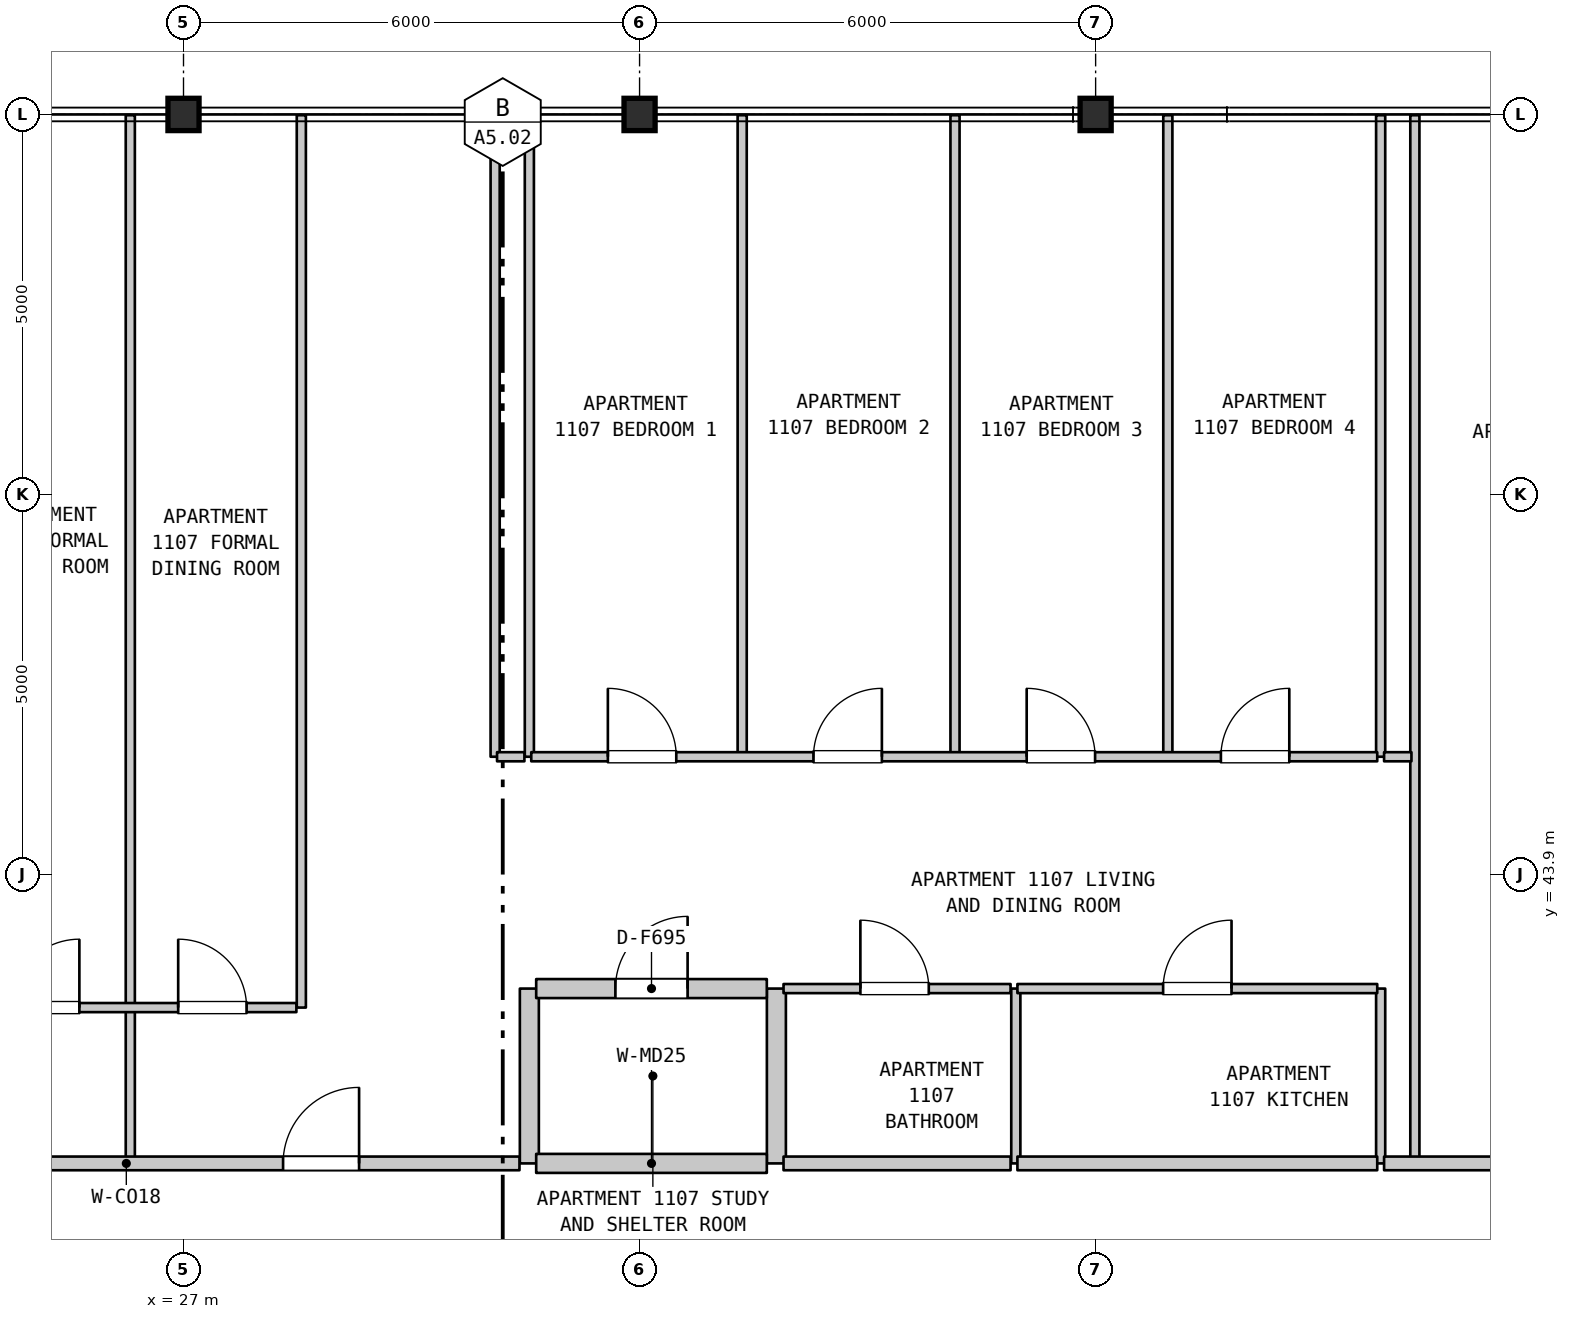
"""IFC4 building model, lengths in metres.
Left out: names, types, materials, properties, quantities, classifications, styles, units other than length and angle.
Written with IfcOpenShell. Run it as: python <this file> out.ifc"""

import sys

from ifc_helpers import new_model, si_unit, direction, frame, frame_2d, origin, origin_2d, place, context, subcontext, project, spatial, rectangle, i_section, extrude, element, fill, save


model = new_model("IFC4")
c1 = context("Model", 3, precision=1e-05, world=origin(), true_north=direction((0.0, 1.0)))
c2 = subcontext(c1, "Body", "Model", "MODEL_VIEW")
j1 = project(units=[si_unit("LENGTHUNIT", "METRE"), si_unit("PLANEANGLEUNIT", "RADIAN")], contexts=[c1])
p1 = place(None, origin())
s1 = spatial("IfcSite", under=j1, at=p1, CompositionType="ELEMENT")
p2 = place(p1, origin())
s2 = spatial("IfcBuilding", under=s1, at=p2, CompositionType="ELEMENT")
p3 = place(p2, frame((0.0, 0.0, 49.9)))
s3 = spatial("IfcBuildingStorey", under=s2, at=p3, CompositionType="ELEMENT", Elevation=49.9)
for number, where, z_axis, x_axis in (
    (1, (27.0, 53.9, 0.0), (0.0, 0.0, 1.0), (1.0, 0.0, 0.0)),
    (2, (33.0, 53.9, 0.0), (0.0, 0.0, 1.0), (1.0, 0.0, 0.0)),
    (3, (39.0, 53.9, 0.0), (0.0, 0.0, 1.0), (1.0, 0.0, 0.0)),
):
    element("IfcColumn", number, at=place(p3, frame(where, z_axis=z_axis, x_axis=x_axis)), inside=s3, PredefinedType="COLUMN", context=c2, shape_type="SweptSolid", body=[
        extrude(i_section(OverallWidth=0.409, OverallDepth=0.425, WebThickness=0.032, FlangeThickness=0.052, FilletRadius=0.015, at=origin_2d()), origin(), (0.0, 0.0, 1.0), 3.7),
    ])
p4 = place(p3, frame((26.3, 40.1, 0.0), z_axis=(0.0, 0.0, 1.0), x_axis=(0.0, 1.0, 0.0)))
e4 = element("IfcWall", 4, at=p4, inside=s3, PredefinedType="PARTITIONING", context=c2, shape_type="SweptSolid", body=[
    extrude(rectangle(XDim=2.05, YDim=0.12, at=frame_2d((1.025, 0.0))), origin(), (0.0, 0.0, 1.0), 3.385),
])
for number, where, z_axis, x_axis in (
    (5, (26.3, 42.15, 0.0), (0.0, 0.0, 1.0), (0.0, 1.0, 0.0)),
    (6, (28.55, 42.15, 0.0), (0.0, 0.0, 1.0), (0.0, 1.0, 0.0)),
):
    element("IfcWall", number, at=place(p3, frame(where, z_axis=z_axis, x_axis=x_axis)), inside=s3, PredefinedType="PARTITIONING", context=c2, shape_type="SweptSolid", body=[
        extrude(rectangle(XDim=11.74, YDim=0.12, at=frame_2d((5.87, 0.0))), origin(), (0.0, 0.0, 1.0), 3.385),
    ])
p5 = place(p3, frame((31.1, 45.45, 0.0), z_axis=(0.0, 0.0, 1.0), x_axis=(0.0, 1.0, 0.0)))
e7 = element("IfcWall", 7, at=p5, inside=s3, PredefinedType="PARTITIONING", context=c2, shape_type="SweptSolid", body=[
    extrude(rectangle(XDim=8.44, YDim=0.12, at=frame_2d((4.22, 0.0))), origin(), (0.0, 0.0, 1.0), 3.385),
])
p6 = place(p3, frame((31.55, 40.1, 0.0), z_axis=(0.0, 0.0, 1.0), x_axis=(0.0, 1.0, 0.0)))
e8 = element("IfcWall", 8, at=p6, inside=s3, PredefinedType="STANDARD", context=c2, shape_type="SweptSolid", body=[
    extrude(rectangle(XDim=2.3, YDim=0.25, at=frame_2d((1.15, 0.0))), origin(), (0.0, 0.0, 1.0), 3.385),
])
for number, where, z_axis, x_axis in (
    (9, (31.55, 45.45, 0.0), (0.0, 0.0, 1.0), (0.0, 1.0, 0.0)),
    (10, (34.35, 45.45, 0.0), (0.0, 0.0, 1.0), (0.0, 1.0, 0.0)),
):
    element("IfcWall", number, at=place(p3, frame(where, z_axis=z_axis, x_axis=x_axis)), inside=s3, PredefinedType="PARTITIONING", context=c2, shape_type="SweptSolid", body=[
        extrude(rectangle(XDim=8.44, YDim=0.12, at=frame_2d((4.22, 0.0))), origin(), (0.0, 0.0, 1.0), 3.385),
    ])
p7 = place(p3, frame((34.8, 40.1, 0.0), z_axis=(0.0, 0.0, 1.0), x_axis=(0.0, 1.0, 0.0)))
e11 = element("IfcWall", 11, at=p7, inside=s3, PredefinedType="STANDARD", context=c2, shape_type="SweptSolid", body=[
    extrude(rectangle(XDim=2.3, YDim=0.25, at=frame_2d((1.15, 0.0))), origin(), (0.0, 0.0, 1.0), 3.385),
])
p8 = place(p3, frame((37.15, 45.45, 0.0), z_axis=(0.0, 0.0, 1.0), x_axis=(0.0, 1.0, 0.0)))
e12 = element("IfcWall", 12, at=p8, inside=s3, PredefinedType="PARTITIONING", context=c2, shape_type="SweptSolid", body=[
    extrude(rectangle(XDim=8.44, YDim=0.12, at=frame_2d((4.22, 0.0))), origin(), (0.0, 0.0, 1.0), 3.385),
])
p9 = place(p3, frame((37.95, 40.1, 0.0), z_axis=(0.0, 0.0, 1.0), x_axis=(0.0, 1.0, 0.0)))
e13 = element("IfcWall", 13, at=p9, inside=s3, PredefinedType="PARTITIONING", context=c2, shape_type="SweptSolid", body=[
    extrude(rectangle(XDim=2.3, YDim=0.12, at=frame_2d((1.15, 0.0))), origin(), (0.0, 0.0, 1.0), 3.385),
])
p10 = place(p3, frame((39.95, 45.45, 0.0), z_axis=(0.0, 0.0, 1.0), x_axis=(0.0, 1.0, 0.0)))
e14 = element("IfcWall", 14, at=p10, inside=s3, PredefinedType="PARTITIONING", context=c2, shape_type="SweptSolid", body=[
    extrude(rectangle(XDim=8.44, YDim=0.12, at=frame_2d((4.22, 0.0))), origin(), (0.0, 0.0, 1.0), 3.385),
])
p11 = place(p3, frame((42.75, 40.1, 0.0), z_axis=(0.0, 0.0, 1.0), x_axis=(0.0, 1.0, 0.0)))
e15 = element("IfcWall", 15, at=p11, inside=s3, PredefinedType="PARTITIONING", context=c2, shape_type="SweptSolid", body=[
    extrude(rectangle(XDim=2.3, YDim=0.12, at=frame_2d((1.15, 0.0))), origin(), (0.0, 0.0, 1.0), 3.385),
])
p12 = place(p3, frame((42.75, 45.45, 0.0), z_axis=(0.0, 0.0, 1.0), x_axis=(0.0, 1.0, 0.0)))
e16 = element("IfcWall", 16, at=p12, inside=s3, PredefinedType="PARTITIONING", context=c2, shape_type="SweptSolid", body=[
    extrude(rectangle(XDim=8.44, YDim=0.12, at=frame_2d((4.22, 0.0))), origin(), (0.0, 0.0, 1.0), 3.385),
])
p13 = place(p3, frame((43.2, 40.1, 0.0), z_axis=(0.0, 0.0, 1.0), x_axis=(0.0, 1.0, 0.0)))
e17 = element("IfcWall", 17, at=p13, inside=s3, PredefinedType="PARTITIONING", context=c2, shape_type="SweptSolid", body=[
    extrude(rectangle(XDim=13.79, YDim=0.12, at=frame_2d((6.895, 0.0))), origin(), (0.0, 0.0, 1.0), 3.385),
])
p14 = place(p3, frame((21.075, 40.1, 0.0), z_axis=(0.0, 0.0, 1.0), x_axis=(1.0, 0.0, 0.0)))
e18 = element("IfcWall", 18, at=p14, inside=s3, PredefinedType="STANDARD", context=c2, shape_type="SweptSolid", body=[
    extrude(rectangle(XDim=10.345, YDim=0.18, at=frame_2d((5.172, 0.0))), origin(), (0.0, 0.0, 1.0), 3.385),
])
p15 = place(p14, frame((2.035, 0.0, 0.0)))
e19 = element("IfcOpeningElement", 19, at=p15, cuts=e18, PredefinedType="OPENING", context=c2, shape_type="SweptSolid", body=[
    extrude(rectangle(XDim=1.0, YDim=2.15, at=frame_2d((0.5, 1.075))), frame((0.0, 0.1, 0.0), z_axis=(0.0, -1.0, 0.0), x_axis=(1.0, 0.0, 0.0)), (0.0, 0.0, 1.0), 0.2),
])
p16 = place(p14, frame((7.235, 0.0, 0.0)))
e20 = element("IfcOpeningElement", 20, at=p16, cuts=e18, PredefinedType="OPENING", context=c2, shape_type="SweptSolid", body=[
    extrude(rectangle(XDim=1.0, YDim=2.15, at=frame_2d((0.5, 1.075))), frame((0.0, 0.1, 0.0), z_axis=(0.0, -1.0, 0.0), x_axis=(1.0, 0.0, 0.0)), (0.0, 0.0, 1.0), 0.2),
])
p17 = place(p3, frame((31.64, 40.1, 0.0), z_axis=(0.0, 0.0, 1.0), x_axis=(1.0, 0.0, 0.0)))
e21 = element("IfcWall", 21, at=p17, inside=s3, PredefinedType="STANDARD", context=c2, shape_type="SweptSolid", body=[
    extrude(rectangle(XDim=3.034, YDim=0.25, at=frame_2d((1.517, 0.0))), origin(), (0.0, 0.0, 1.0), 3.385),
])
p18 = place(p3, frame((34.894, 40.1, 0.0), z_axis=(0.0, 0.0, 1.0), x_axis=(1.0, 0.0, 0.0)))
e22 = element("IfcWall", 22, at=p18, inside=s3, PredefinedType="STANDARD", context=c2, shape_type="SweptSolid", body=[
    extrude(rectangle(XDim=2.987, YDim=0.18, at=frame_2d((1.494, 0.0))), origin(), (0.0, 0.0, 1.0), 3.385),
])
p19 = place(p3, frame((37.971, 40.1, 0.0), z_axis=(0.0, 0.0, 1.0), x_axis=(1.0, 0.0, 0.0)))
e23 = element("IfcWall", 23, at=p19, inside=s3, PredefinedType="STANDARD", context=c2, shape_type="SweptSolid", body=[
    extrude(rectangle(XDim=4.734, YDim=0.18, at=frame_2d((2.367, 0.0))), origin(), (0.0, 0.0, 1.0), 3.385),
])
p20 = place(p3, frame((42.795, 40.1, 0.0), z_axis=(0.0, 0.0, 1.0), x_axis=(1.0, 0.0, 0.0)))
e24 = element("IfcWall", 24, at=p20, inside=s3, PredefinedType="STANDARD", context=c2, shape_type="SweptSolid", body=[
    extrude(rectangle(XDim=3.96, YDim=0.18, at=frame_2d((1.98, 0.0))), origin(), (0.0, 0.0, 1.0), 3.385),
])
p21 = place(p20, frame((1.609, 0.0, 0.0)))
e25 = element("IfcOpeningElement", 25, at=p21, cuts=e24, PredefinedType="OPENING", context=c2, shape_type="SweptSolid", body=[
    extrude(rectangle(XDim=1.0, YDim=2.15, at=frame_2d((0.5, 1.075))), frame((0.0, 0.1, 0.0), z_axis=(0.0, -1.0, 0.0), x_axis=(1.0, 0.0, 0.0)), (0.0, 0.0, 1.0), 0.2),
])
p22 = place(p3, frame((24.075, 42.15, 0.0), z_axis=(0.0, 0.0, 1.0), x_axis=(1.0, 0.0, 0.0)))
e26 = element("IfcWall", 26, at=p22, inside=s3, PredefinedType="PARTITIONING", context=c2, shape_type="SweptSolid", body=[
    extrude(rectangle(XDim=4.41, YDim=0.12, at=frame_2d((2.205, 0.0))), origin(), (0.0, 0.0, 1.0), 3.385),
])
p23 = place(p22, frame((0.655, 0.0, 0.0)))
e27 = element("IfcOpeningElement", 27, at=p23, cuts=e26, PredefinedType="OPENING", context=c2, shape_type="SweptSolid", body=[
    extrude(rectangle(XDim=0.9, YDim=2.15, at=frame_2d((0.45, 1.075))), frame((0.0, 0.07, 0.0), z_axis=(0.0, -1.0, 0.0), x_axis=(1.0, 0.0, 0.0)), (0.0, 0.0, 1.0), 0.14),
])
p24 = place(p22, frame((2.855, 0.0, 0.0)))
e28 = element("IfcOpeningElement", 28, at=p24, cuts=e26, PredefinedType="OPENING", context=c2, shape_type="SweptSolid", body=[
    extrude(rectangle(XDim=0.9, YDim=2.15, at=frame_2d((0.45, 1.075))), frame((0.0, 0.07, 0.0), z_axis=(0.0, -1.0, 0.0), x_axis=(1.0, 0.0, 0.0)), (0.0, 0.0, 1.0), 0.14),
])
p25 = place(p3, frame((31.64, 42.4, 0.0), z_axis=(0.0, 0.0, 1.0), x_axis=(1.0, 0.0, 0.0)))
e29 = element("IfcWall", 29, at=p25, inside=s3, PredefinedType="STANDARD", context=c2, shape_type="SweptSolid", body=[
    extrude(rectangle(XDim=3.034, YDim=0.25, at=frame_2d((1.517, 0.0))), origin(), (0.0, 0.0, 1.0), 3.385),
])
p26 = place(p25, frame((1.042, 0.0, 0.0)))
e30 = element("IfcOpeningElement", 30, at=p26, cuts=e29, PredefinedType="OPENING", context=c2, shape_type="SweptSolid", body=[
    extrude(rectangle(XDim=0.95, YDim=2.15, at=frame_2d((0.475, 1.075))), frame((0.0, 0.135, 0.0), z_axis=(0.0, -1.0, 0.0), x_axis=(1.0, 0.0, 0.0)), (0.0, 0.0, 1.0), 0.27),
])
p27 = place(p3, frame((34.894, 42.4, 0.0), z_axis=(0.0, 0.0, 1.0), x_axis=(1.0, 0.0, 0.0)))
e31 = element("IfcWall", 31, at=p27, inside=s3, PredefinedType="PARTITIONING", context=c2, shape_type="SweptSolid", body=[
    extrude(rectangle(XDim=2.987, YDim=0.12, at=frame_2d((1.494, 0.0))), origin(), (0.0, 0.0, 1.0), 3.385),
])
p28 = place(p27, frame((1.011, 0.0, 0.0)))
e32 = element("IfcOpeningElement", 32, at=p28, cuts=e31, PredefinedType="OPENING", context=c2, shape_type="SweptSolid", body=[
    extrude(rectangle(XDim=0.9, YDim=2.1, at=frame_2d((0.45, 1.05))), frame((0.0, 0.07, 0.0), z_axis=(0.0, -1.0, 0.0), x_axis=(1.0, 0.0, 0.0)), (0.0, 0.0, 1.0), 0.14),
])
p29 = place(p3, frame((37.971, 42.4, 0.0), z_axis=(0.0, 0.0, 1.0), x_axis=(1.0, 0.0, 0.0)))
e33 = element("IfcWall", 33, at=p29, inside=s3, PredefinedType="PARTITIONING", context=c2, shape_type="SweptSolid", body=[
    extrude(rectangle(XDim=4.734, YDim=0.12, at=frame_2d((2.367, 0.0))), origin(), (0.0, 0.0, 1.0), 3.385),
])
p30 = place(p29, frame((1.917, 0.0, 0.0)))
e34 = element("IfcOpeningElement", 34, at=p30, cuts=e33, PredefinedType="OPENING", context=c2, shape_type="SweptSolid", body=[
    extrude(rectangle(XDim=0.9, YDim=2.15, at=frame_2d((0.45, 1.075))), frame((0.0, 0.07, 0.0), z_axis=(0.0, -1.0, 0.0), x_axis=(1.0, 0.0, 0.0)), (0.0, 0.0, 1.0), 0.14),
])
p31 = place(p3, frame((31.125, 45.45, 0.0), z_axis=(0.0, 0.0, 1.0), x_axis=(1.0, 0.0, 0.0)))
e35 = element("IfcWall", 35, at=p31, inside=s3, PredefinedType="PARTITIONING", context=c2, shape_type="SweptSolid", body=[
    extrude(rectangle(XDim=0.36, YDim=0.12, at=frame_2d((0.18, 0.0))), origin(), (0.0, 0.0, 1.0), 3.385),
])
p32 = place(p3, frame((31.575, 45.45, 0.0), z_axis=(0.0, 0.0, 1.0), x_axis=(1.0, 0.0, 0.0)))
e36 = element("IfcWall", 36, at=p32, inside=s3, PredefinedType="PARTITIONING", context=c2, shape_type="SweptSolid", body=[
    extrude(rectangle(XDim=11.13, YDim=0.12, at=frame_2d((5.565, 0.0))), origin(), (0.0, 0.0, 1.0), 3.385),
])
p33 = place(p32, frame((1.008, 0.0, 0.0)))
e37 = element("IfcOpeningElement", 37, at=p33, cuts=e36, PredefinedType="OPENING", context=c2, shape_type="SweptSolid", body=[
    extrude(rectangle(XDim=0.9, YDim=2.15, at=frame_2d((0.45, 1.075))), frame((0.0, 0.07, 0.0), z_axis=(0.0, -1.0, 0.0), x_axis=(1.0, 0.0, 0.0)), (0.0, 0.0, 1.0), 0.14),
])
p34 = place(p32, frame((3.713, 0.0, 0.0)))
e38 = element("IfcOpeningElement", 38, at=p34, cuts=e36, PredefinedType="OPENING", context=c2, shape_type="SweptSolid", body=[
    extrude(rectangle(XDim=0.9, YDim=2.15, at=frame_2d((0.45, 1.075))), frame((0.0, 0.07, 0.0), z_axis=(0.0, -1.0, 0.0), x_axis=(1.0, 0.0, 0.0)), (0.0, 0.0, 1.0), 0.14),
])
p35 = place(p32, frame((6.518, 0.0, 0.0)))
e39 = element("IfcOpeningElement", 39, at=p35, cuts=e36, PredefinedType="OPENING", context=c2, shape_type="SweptSolid", body=[
    extrude(rectangle(XDim=0.9, YDim=2.15, at=frame_2d((0.45, 1.075))), frame((0.0, 0.07, 0.0), z_axis=(0.0, -1.0, 0.0), x_axis=(1.0, 0.0, 0.0)), (0.0, 0.0, 1.0), 0.14),
])
p36 = place(p32, frame((9.073, 0.0, 0.0)))
e40 = element("IfcOpeningElement", 40, at=p36, cuts=e36, PredefinedType="OPENING", context=c2, shape_type="SweptSolid", body=[
    extrude(rectangle(XDim=0.9, YDim=2.15, at=frame_2d((0.45, 1.075))), frame((0.0, 0.07, 0.0), z_axis=(0.0, -1.0, 0.0), x_axis=(1.0, 0.0, 0.0)), (0.0, 0.0, 1.0), 0.14),
])
p37 = place(p3, frame((42.795, 45.45, 0.0), z_axis=(0.0, 0.0, 1.0), x_axis=(1.0, 0.0, 0.0)))
e41 = element("IfcWall", 41, at=p37, inside=s3, PredefinedType="PARTITIONING", context=c2, shape_type="SweptSolid", body=[
    extrude(rectangle(XDim=0.36, YDim=0.12, at=frame_2d((0.18, 0.0))), origin(), (0.0, 0.0, 1.0), 3.385),
])
p38 = place(p16, origin())
e42 = element("IfcDoor", 42, at=p38, inside=s3, OperationType="SINGLE_SWING_RIGHT", PredefinedType="DOOR", context=c2, shape_type="SweptSolid", body=[
    extrude(rectangle(XDim=1.0, YDim=2.15, at=frame_2d((0.5, 1.075))), frame((0.0, 0.025, 0.0), z_axis=(0.0, -1.0, 0.0), x_axis=(1.0, 0.0, 0.0)), (0.0, 0.0, 1.0), 0.05),
])
fill(e20, e42)
p39 = place(p23, origin())
e43 = element("IfcDoor", 43, at=p39, inside=s3, OperationType="SINGLE_SWING_RIGHT", PredefinedType="DOOR", context=c2, shape_type="SweptSolid", body=[
    extrude(rectangle(XDim=0.9, YDim=2.15, at=frame_2d((0.45, 1.075))), frame((0.0, 0.025, 0.0), z_axis=(0.0, -1.0, 0.0), x_axis=(1.0, 0.0, 0.0)), (0.0, 0.0, 1.0), 0.05),
])
fill(e27, e43)
p40 = place(p24, origin())
e44 = element("IfcDoor", 44, at=p40, inside=s3, OperationType="SINGLE_SWING_LEFT", PredefinedType="DOOR", context=c2, shape_type="SweptSolid", body=[
    extrude(rectangle(XDim=0.9, YDim=2.15, at=frame_2d((0.45, 1.075))), frame((0.0, 0.025, 0.0), z_axis=(0.0, -1.0, 0.0), x_axis=(1.0, 0.0, 0.0)), (0.0, 0.0, 1.0), 0.05),
])
fill(e28, e44)
p41 = place(p26, origin())
e45 = element("IfcDoor", 45, at=p41, inside=s3, OperationType="SINGLE_SWING_RIGHT", PredefinedType="DOOR", context=c2, shape_type="SweptSolid", body=[
    extrude(rectangle(XDim=0.95, YDim=2.15, at=frame_2d((0.475, 1.075))), frame((0.0, 0.025, 0.0), z_axis=(0.0, -1.0, 0.0), x_axis=(1.0, 0.0, 0.0)), (0.0, 0.0, 1.0), 0.05),
])
fill(e30, e45)
p42 = place(p28, origin())
e46 = element("IfcDoor", 46, at=p42, inside=s3, OperationType="SINGLE_SWING_LEFT", PredefinedType="DOOR", context=c2, shape_type="SweptSolid", body=[
    extrude(rectangle(XDim=0.9, YDim=2.1, at=frame_2d((0.45, 1.05))), frame((0.0, 0.025, 0.0), z_axis=(0.0, -1.0, 0.0), x_axis=(1.0, 0.0, 0.0)), (0.0, 0.0, 1.0), 0.05),
])
fill(e32, e46)
p43 = place(p30, origin())
e47 = element("IfcDoor", 47, at=p43, inside=s3, OperationType="SINGLE_SWING_RIGHT", PredefinedType="DOOR", context=c2, shape_type="SweptSolid", body=[
    extrude(rectangle(XDim=0.9, YDim=2.15, at=frame_2d((0.45, 1.075))), frame((0.0, 0.025, 0.0), z_axis=(0.0, -1.0, 0.0), x_axis=(1.0, 0.0, 0.0)), (0.0, 0.0, 1.0), 0.05),
])
fill(e34, e47)
p44 = place(p33, origin())
e48 = element("IfcDoor", 48, at=p44, inside=s3, OperationType="SINGLE_SWING_LEFT", PredefinedType="DOOR", context=c2, shape_type="SweptSolid", body=[
    extrude(rectangle(XDim=0.9, YDim=2.15, at=frame_2d((0.45, 1.075))), frame((0.0, 0.025, 0.0), z_axis=(0.0, -1.0, 0.0), x_axis=(1.0, 0.0, 0.0)), (0.0, 0.0, 1.0), 0.05),
])
fill(e37, e48)
p45 = place(p34, origin())
e49 = element("IfcDoor", 49, at=p45, inside=s3, OperationType="SINGLE_SWING_RIGHT", PredefinedType="DOOR", context=c2, shape_type="SweptSolid", body=[
    extrude(rectangle(XDim=0.9, YDim=2.15, at=frame_2d((0.45, 1.075))), frame((0.0, 0.025, 0.0), z_axis=(0.0, -1.0, 0.0), x_axis=(1.0, 0.0, 0.0)), (0.0, 0.0, 1.0), 0.05),
])
fill(e38, e49)
p46 = place(p35, origin())
e50 = element("IfcDoor", 50, at=p46, inside=s3, OperationType="SINGLE_SWING_LEFT", PredefinedType="DOOR", context=c2, shape_type="SweptSolid", body=[
    extrude(rectangle(XDim=0.9, YDim=2.15, at=frame_2d((0.45, 1.075))), frame((0.0, 0.025, 0.0), z_axis=(0.0, -1.0, 0.0), x_axis=(1.0, 0.0, 0.0)), (0.0, 0.0, 1.0), 0.05),
])
fill(e39, e50)
p47 = place(p36, origin())
e51 = element("IfcDoor", 51, at=p47, inside=s3, OperationType="SINGLE_SWING_RIGHT", PredefinedType="DOOR", context=c2, shape_type="SweptSolid", body=[
    extrude(rectangle(XDim=0.9, YDim=2.15, at=frame_2d((0.45, 1.075))), frame((0.0, 0.025, 0.0), z_axis=(0.0, -1.0, 0.0), x_axis=(1.0, 0.0, 0.0)), (0.0, 0.0, 1.0), 0.05),
])
fill(e40, e51)
save(model, sys.argv[1])
